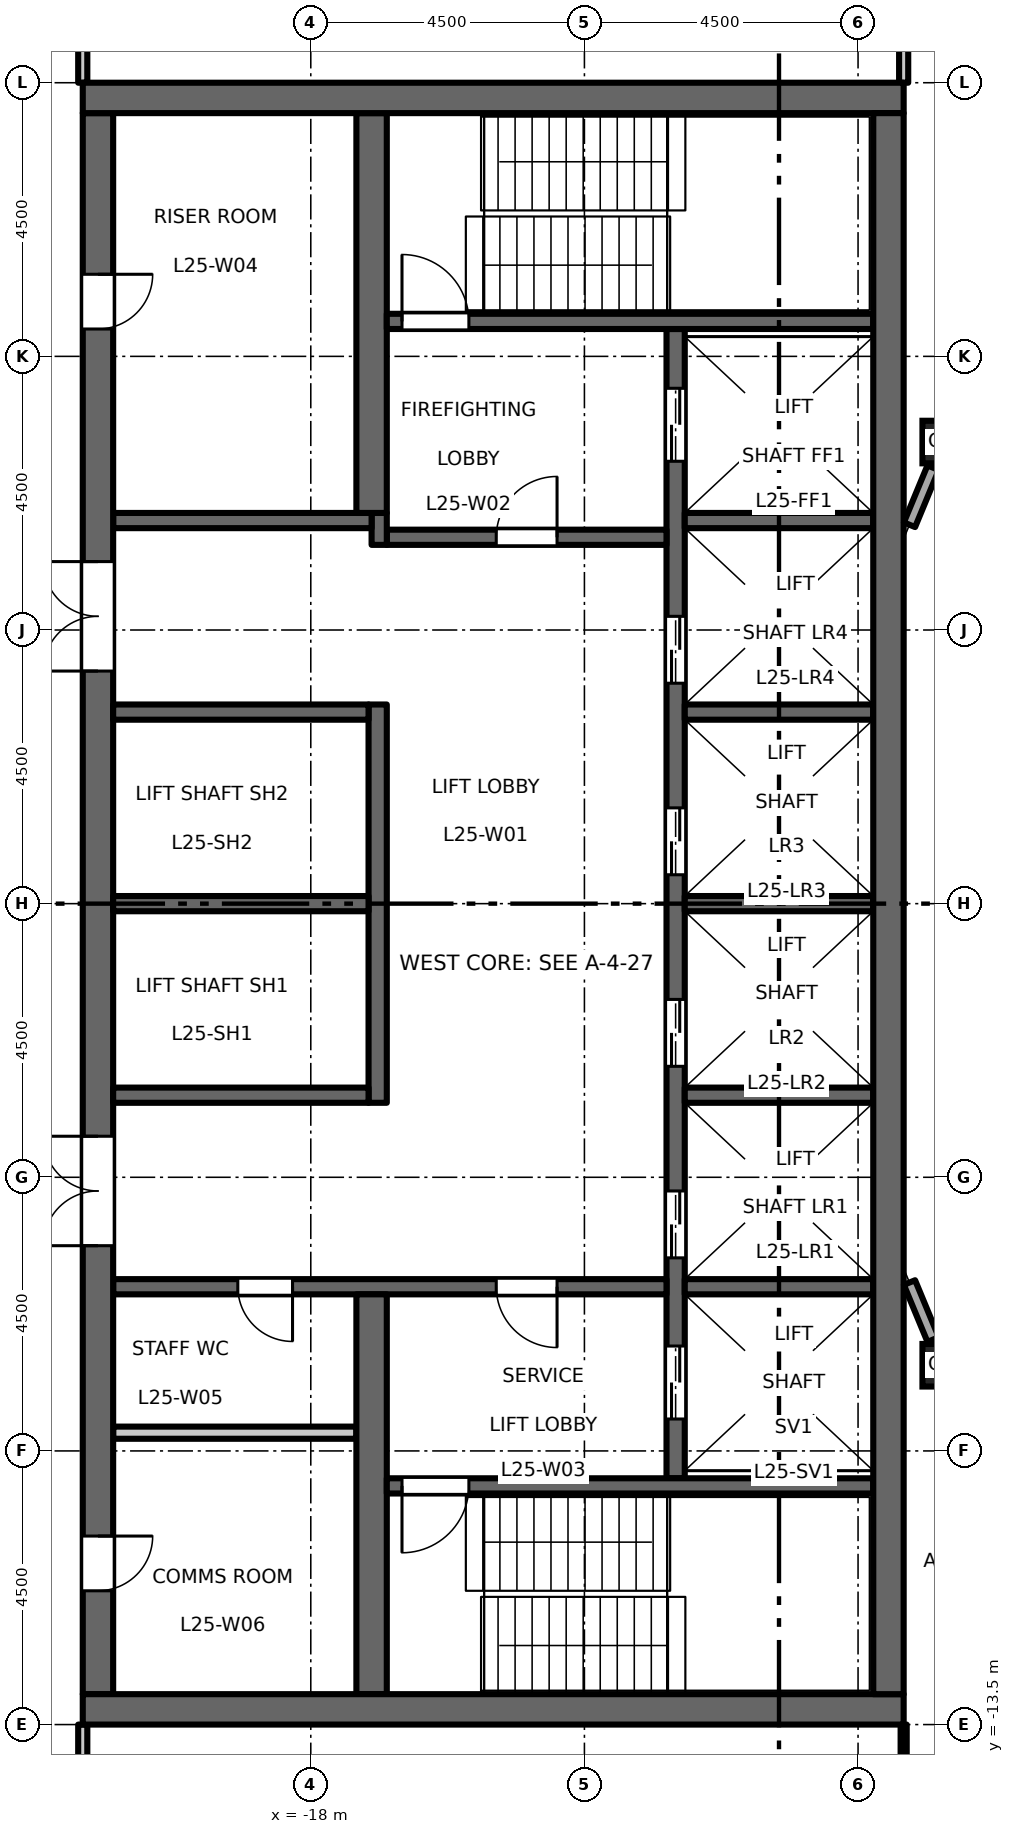
"""IFC4 building model, lengths in metres.
Left out: names, types, materials, properties, quantities, classifications, styles, units other than length and angle.
Written with IfcOpenShell. Run it as: python <this file> out.ifc"""

import sys

from ifc_helpers import new_model, si_unit, direction, frame, frame_2d, origin, origin_2d, place, context, subcontext, project, spatial, rectangle, hollow_rectangle, extrude, element, fill, save


model = new_model("IFC4")
c1 = context("Model", 3, precision=1e-05, world=origin(), true_north=direction((0.0, 1.0)))
c2 = subcontext(c1, "Body", "Model", "MODEL_VIEW")
j1 = project(units=[si_unit("LENGTHUNIT", "METRE"), si_unit("PLANEANGLEUNIT", "RADIAN")], contexts=[c1])
p1 = place(None, origin())
s1 = spatial("IfcSite", under=j1, at=p1, CompositionType="ELEMENT")
p2 = place(p1, origin())
s2 = spatial("IfcBuilding", under=s1, at=p2, CompositionType="ELEMENT")
p3 = place(p2, frame((0.0, 0.0, 118.2)))
s3 = spatial("IfcBuildingStorey", under=s2, at=p3, CompositionType="ELEMENT", Elevation=118.2)
for number, where, z_axis, x_axis in (
    (1, (-7.591, -7.591, 0.0), (0.0, 0.0, 1.0), (1.0, 0.0, 0.0)),
    (2, (-7.591, 7.591, 0.0), (0.0, 0.0, 1.0), (1.0, 0.0, 0.0)),
):
    element("IfcColumn", number, at=place(p3, frame(where, z_axis=z_axis, x_axis=x_axis)), inside=s3, PredefinedType="COLUMN", context=c2, shape_type="SweptSolid", body=[
        extrude(hollow_rectangle(XDim=0.7, YDim=0.7, WallThickness=0.04, at=origin_2d()), origin(), (0.0, 0.0, 1.0), 4.5),
    ])
p4 = place(p3, frame((-12.0, -9.45, 0.0), z_axis=(0.0, 0.0, 1.0), x_axis=(0.0, 1.0, 0.0)))
e3 = element("IfcWall", 3, at=p4, inside=s3, PredefinedType="SHEAR", context=c2, shape_type="SweptSolid", body=[
    extrude(rectangle(XDim=18.9, YDim=0.3, at=frame_2d((9.45, 0.0))), origin(), (0.0, 0.0, 1.0), 4.35),
])
p5 = place(p4, frame((3.625, 0.0, 0.0)))
e4 = element("IfcOpeningElement", 4, at=p5, cuts=e3, PredefinedType="OPENING", context=c2, shape_type="SweptSolid", body=[
    extrude(rectangle(XDim=1.1, YDim=2.1, at=frame_2d((0.55, 1.05))), frame((0.0, 0.16, 0.0), z_axis=(0.0, -1.0, 0.0), x_axis=(1.0, 0.0, 0.0)), (0.0, 0.0, 1.0), 0.32),
])
p6 = place(p4, frame((6.775, 0.0, 0.0)))
e5 = element("IfcOpeningElement", 5, at=p6, cuts=e3, PredefinedType="OPENING", context=c2, shape_type="SweptSolid", body=[
    extrude(rectangle(XDim=1.1, YDim=2.1, at=frame_2d((0.55, 1.05))), frame((0.0, 0.16, 0.0), z_axis=(0.0, -1.0, 0.0), x_axis=(1.0, 0.0, 0.0)), (0.0, 0.0, 1.0), 0.32),
])
p7 = place(p4, frame((9.925, 0.0, 0.0)))
e6 = element("IfcOpeningElement", 6, at=p7, cuts=e3, PredefinedType="OPENING", context=c2, shape_type="SweptSolid", body=[
    extrude(rectangle(XDim=1.1, YDim=2.1, at=frame_2d((0.55, 1.05))), frame((0.0, 0.16, 0.0), z_axis=(0.0, -1.0, 0.0), x_axis=(1.0, 0.0, 0.0)), (0.0, 0.0, 1.0), 0.32),
])
p8 = place(p4, frame((13.075, 0.0, 0.0)))
e7 = element("IfcOpeningElement", 7, at=p8, cuts=e3, PredefinedType="OPENING", context=c2, shape_type="SweptSolid", body=[
    extrude(rectangle(XDim=1.1, YDim=2.1, at=frame_2d((0.55, 1.05))), frame((0.0, 0.16, 0.0), z_axis=(0.0, -1.0, 0.0), x_axis=(1.0, 0.0, 0.0)), (0.0, 0.0, 1.0), 0.32),
])
p9 = place(p4, frame((16.725, 0.0, 0.0)))
e8 = element("IfcOpeningElement", 8, at=p9, cuts=e3, PredefinedType="OPENING", context=c2, shape_type="SweptSolid", body=[
    extrude(rectangle(XDim=1.2, YDim=2.1, at=frame_2d((0.6, 1.05))), frame((0.0, 0.16, 0.0), z_axis=(0.0, -1.0, 0.0), x_axis=(1.0, 0.0, 0.0)), (0.0, 0.0, 1.0), 0.32),
])
p10 = place(p4, frame((0.975, 0.0, 0.0)))
e9 = element("IfcOpeningElement", 9, at=p10, cuts=e3, PredefinedType="OPENING", context=c2, shape_type="SweptSolid", body=[
    extrude(rectangle(XDim=1.2, YDim=2.1, at=frame_2d((0.6, 1.05))), frame((0.0, 0.16, 0.0), z_axis=(0.0, -1.0, 0.0), x_axis=(1.0, 0.0, 0.0)), (0.0, 0.0, 1.0), 0.32),
])
p11 = place(p3, frame((-12.15, 6.025, 0.0), z_axis=(0.0, 0.0, 1.0), x_axis=(-1.0, 0.0, 0.0)))
e10 = element("IfcWall", 10, at=p11, inside=s3, PredefinedType="SHEAR", context=c2, shape_type="SweptSolid", body=[
    extrude(rectangle(XDim=4.6, YDim=0.25, at=frame_2d((2.3, 0.0))), origin(), (0.0, 0.0, 1.0), 4.35),
])
p12 = place(p11, frame((1.8, 0.0, 0.0)))
e11 = element("IfcOpeningElement", 11, at=p12, cuts=e10, PredefinedType="OPENING", context=c2, shape_type="SweptSolid", body=[
    extrude(rectangle(XDim=1.0, YDim=2.1, at=frame_2d((0.5, 1.05))), frame((0.0, 0.135, 0.0), z_axis=(0.0, -1.0, 0.0), x_axis=(1.0, 0.0, 0.0)), (0.0, 0.0, 1.0), 0.27),
])
p13 = place(p3, frame((-16.875, 5.9, 0.0), z_axis=(0.0, 0.0, 1.0), x_axis=(0.0, 1.0, 0.0)))
e12 = element("IfcWall", 12, at=p13, inside=s3, PredefinedType="SHEAR", context=c2, shape_type="SweptSolid", body=[
    extrude(rectangle(XDim=0.525, YDim=0.25, at=frame_2d((0.263, 0.0))), origin(), (0.0, 0.0, 1.0), 4.35),
])
p14 = place(p3, frame((-17.0, 6.3, 0.0), z_axis=(0.0, 0.0, 1.0), x_axis=(-1.0, 0.0, 0.0)))
e13 = element("IfcWall", 13, at=p14, inside=s3, PredefinedType="SHEAR", context=c2, shape_type="SweptSolid", body=[
    extrude(rectangle(XDim=4.25, YDim=0.25, at=frame_2d((2.125, 0.0))), origin(), (0.0, 0.0, 1.0), 4.35),
])
p15 = place(p3, frame((-12.15, -6.3, 0.0), z_axis=(0.0, 0.0, 1.0), x_axis=(-1.0, 0.0, 0.0)))
e14 = element("IfcWall", 14, at=p15, inside=s3, PredefinedType="SHEAR", context=c2, shape_type="SweptSolid", body=[
    extrude(rectangle(XDim=9.1, YDim=0.25, at=frame_2d((4.55, 0.0))), origin(), (0.0, 0.0, 1.0), 4.35),
])
p16 = place(p15, frame((1.8, 0.0, 0.0)))
e15 = element("IfcOpeningElement", 15, at=p16, cuts=e14, PredefinedType="OPENING", context=c2, shape_type="SweptSolid", body=[
    extrude(rectangle(XDim=1.0, YDim=2.1, at=frame_2d((0.5, 1.05))), frame((0.0, 0.135, 0.0), z_axis=(0.0, -1.0, 0.0), x_axis=(1.0, 0.0, 0.0)), (0.0, 0.0, 1.0), 0.27),
])
p17 = place(p15, frame((6.15, 0.0, 0.0)))
e16 = element("IfcOpeningElement", 16, at=p17, cuts=e14, PredefinedType="OPENING", context=c2, shape_type="SweptSolid", body=[
    extrude(rectangle(XDim=0.9, YDim=2.1, at=frame_2d((0.45, 1.05))), frame((0.0, 0.135, 0.0), z_axis=(0.0, -1.0, 0.0), x_axis=(1.0, 0.0, 0.0)), (0.0, 0.0, 1.0), 0.27),
])
p18 = place(p3, frame((-21.5, -13.0, 0.0), z_axis=(0.0, 0.0, 1.0), x_axis=(0.0, 1.0, 0.0)))
e17 = element("IfcWall", 17, at=p18, inside=s3, PredefinedType="SHEAR", context=c2, shape_type="SweptSolid", body=[
    extrude(rectangle(XDim=26.0, YDim=0.5, at=frame_2d((13.0, 0.0))), origin(), (0.0, 0.0, 1.0), 4.35),
])
p19 = place(p18, frame((16.825, 0.0, 0.0)))
e18 = element("IfcOpeningElement", 18, at=p19, cuts=e17, PredefinedType="OPENING", context=c2, shape_type="SweptSolid", body=[
    extrude(rectangle(XDim=1.8, YDim=2.1, at=frame_2d((0.9, 1.05))), frame((0.0, 0.26, 0.0), z_axis=(0.0, -1.0, 0.0), x_axis=(1.0, 0.0, 0.0)), (0.0, 0.0, 1.0), 0.52),
])
p20 = place(p18, frame((7.375, 0.0, 0.0)))
e19 = element("IfcOpeningElement", 19, at=p20, cuts=e17, PredefinedType="OPENING", context=c2, shape_type="SweptSolid", body=[
    extrude(rectangle(XDim=1.8, YDim=2.1, at=frame_2d((0.9, 1.05))), frame((0.0, 0.26, 0.0), z_axis=(0.0, -1.0, 0.0), x_axis=(1.0, 0.0, 0.0)), (0.0, 0.0, 1.0), 0.52),
])
p21 = place(p18, frame((22.45, 0.0, 0.0)))
e20 = element("IfcOpeningElement", 20, at=p21, cuts=e17, PredefinedType="OPENING", context=c2, shape_type="SweptSolid", body=[
    extrude(rectangle(XDim=0.9, YDim=2.1, at=frame_2d((0.45, 1.05))), frame((0.0, 0.26, 0.0), z_axis=(0.0, -1.0, 0.0), x_axis=(1.0, 0.0, 0.0)), (0.0, 0.0, 1.0), 0.52),
])
p22 = place(p18, frame((1.7, 0.0, 0.0)))
e21 = element("IfcOpeningElement", 21, at=p22, cuts=e17, PredefinedType="OPENING", context=c2, shape_type="SweptSolid", body=[
    extrude(rectangle(XDim=0.9, YDim=2.1, at=frame_2d((0.45, 1.05))), frame((0.0, 0.26, 0.0), z_axis=(0.0, -1.0, 0.0), x_axis=(1.0, 0.0, 0.0)), (0.0, 0.0, 1.0), 0.52),
])
p23 = place(p3, frame((-17.25, -8.7, 0.0), z_axis=(0.0, 0.0, 1.0), x_axis=(-1.0, 0.0, 0.0)))
e22 = element("IfcWall", 22, at=p23, inside=s3, PredefinedType="PARTITIONING", context=c2, shape_type="SweptSolid", body=[
    extrude(rectangle(XDim=4.0, YDim=0.2, at=frame_2d((2.0, 0.0))), origin(), (0.0, 0.0, 1.0), 4.35),
])
p24 = place(p3, frame((-16.9, -3.275, 0.0), z_axis=(0.0, 0.0, 1.0), x_axis=(0.0, 1.0, 0.0)))
e23 = element("IfcWall", 23, at=p24, inside=s3, PredefinedType="SHEAR", context=c2, shape_type="SweptSolid", body=[
    extrude(rectangle(XDim=6.55, YDim=0.3, at=frame_2d((3.275, 0.0))), origin(), (0.0, 0.0, 1.0), 4.35),
])
for number, where, z_axis, x_axis in (
    (24, (-17.05, 0.0, 0.0), (0.0, 0.0, 1.0), (-1.0, 0.0, 0.0)),
    (25, (-17.05, 3.15, 0.0), (0.0, 0.0, 1.0), (-1.0, 0.0, 0.0)),
    (26, (-17.05, -3.15, 0.0), (0.0, 0.0, 1.0), (-1.0, 0.0, 0.0)),
):
    element("IfcWall", number, at=place(p3, frame(where, z_axis=z_axis, x_axis=x_axis)), inside=s3, PredefinedType="SHEAR", context=c2, shape_type="SweptSolid", body=[
        extrude(rectangle(XDim=4.2, YDim=0.25, at=frame_2d((2.1, 0.0))), origin(), (0.0, 0.0, 1.0), 4.35),
    ])
for number, where, z_axis, x_axis in (
    (27, (-17.0, 6.425, 0.0), (0.0, 0.0, 1.0), (0.0, 1.0, 0.0)),
    (28, (-17.0, -13.0, 0.0), (0.0, 0.0, 1.0), (0.0, 1.0, 0.0)),
):
    element("IfcWall", number, at=place(p3, frame(where, z_axis=z_axis, x_axis=x_axis)), inside=s3, PredefinedType="SHEAR", context=c2, shape_type="SweptSolid", body=[
        extrude(rectangle(XDim=6.575, YDim=0.5, at=frame_2d((3.288, 0.0))), origin(), (0.0, 0.0, 1.0), 4.35),
    ])
for number, where, z_axis, x_axis in (
    (29, (-8.75, 0.0, 0.0), (0.0, 0.0, 1.0), (-1.0, 0.0, 0.0)),
    (30, (-8.75, 3.15, 0.0), (0.0, 0.0, 1.0), (-1.0, 0.0, 0.0)),
    (31, (-8.75, 6.3, 0.0), (0.0, 0.0, 1.0), (-1.0, 0.0, 0.0)),
    (32, (-8.75, -3.15, 0.0), (0.0, 0.0, 1.0), (-1.0, 0.0, 0.0)),
    (33, (-8.75, -6.3, 0.0), (0.0, 0.0, 1.0), (-1.0, 0.0, 0.0)),
):
    element("IfcWall", number, at=place(p3, frame(where, z_axis=z_axis, x_axis=x_axis)), inside=s3, PredefinedType="SHEAR", context=c2, shape_type="SweptSolid", body=[
        extrude(rectangle(XDim=3.1, YDim=0.25, at=frame_2d((1.55, 0.0))), origin(), (0.0, 0.0, 1.0), 4.35),
    ])
p25 = place(p3, frame((-8.75, 9.575, 0.0), z_axis=(0.0, 0.0, 1.0), x_axis=(-1.0, 0.0, 0.0)))
e34 = element("IfcWall", 34, at=p25, inside=s3, PredefinedType="SHEAR", context=c2, shape_type="SweptSolid", body=[
    extrude(rectangle(XDim=8.0, YDim=0.25, at=frame_2d((4.0, 0.0))), origin(), (0.0, 0.0, 1.0), 4.35),
])
p26 = place(p25, frame((6.65, 0.0, 0.0)))
e35 = element("IfcOpeningElement", 35, at=p26, cuts=e34, PredefinedType="OPENING", context=c2, shape_type="SweptSolid", body=[
    extrude(rectangle(XDim=1.1, YDim=2.1, at=frame_2d((0.55, 1.05))), frame((0.0, 0.135, 0.0), z_axis=(0.0, -1.0, 0.0), x_axis=(1.0, 0.0, 0.0)), (0.0, 0.0, 1.0), 0.27),
])
p27 = place(p3, frame((-8.75, -9.575, 0.0), z_axis=(0.0, 0.0, 1.0), x_axis=(-1.0, 0.0, 0.0)))
e36 = element("IfcWall", 36, at=p27, inside=s3, PredefinedType="SHEAR", context=c2, shape_type="SweptSolid", body=[
    extrude(rectangle(XDim=8.0, YDim=0.25, at=frame_2d((4.0, 0.0))), origin(), (0.0, 0.0, 1.0), 4.35),
])
p28 = place(p27, frame((6.65, 0.0, 0.0)))
e37 = element("IfcOpeningElement", 37, at=p28, cuts=e36, PredefinedType="OPENING", context=c2, shape_type="SweptSolid", body=[
    extrude(rectangle(XDim=1.1, YDim=2.1, at=frame_2d((0.55, 1.05))), frame((0.0, 0.135, 0.0), z_axis=(0.0, -1.0, 0.0), x_axis=(1.0, 0.0, 0.0)), (0.0, 0.0, 1.0), 0.27),
])
for number, where, z_axis, x_axis in (
    (38, (-8.25, 13.25, 0.0), (0.0, 0.0, 1.0), (-1.0, 0.0, 0.0)),
    (39, (-8.25, -13.25, 0.0), (0.0, 0.0, 1.0), (-1.0, 0.0, 0.0)),
):
    element("IfcWall", number, at=place(p3, frame(where, z_axis=z_axis, x_axis=x_axis)), inside=s3, PredefinedType="SHEAR", context=c2, shape_type="SweptSolid", body=[
        extrude(rectangle(XDim=13.5, YDim=0.5, at=frame_2d((6.75, 0.0))), origin(), (0.0, 0.0, 1.0), 4.35),
    ])
p29 = place(p3, frame((-8.5, -13.0, 0.0), z_axis=(0.0, 0.0, 1.0), x_axis=(0.0, 1.0, 0.0)))
e40 = element("IfcWall", 40, at=p29, inside=s3, PredefinedType="SHEAR", context=c2, shape_type="SweptSolid", body=[
    extrude(rectangle(XDim=26.0, YDim=0.5, at=frame_2d((13.0, 0.0))), origin(), (0.0, 0.0, 1.0), 4.35),
])
for number, where, z_axis, x_axis in (
    (41, (-7.766, 7.168, 0.0), (0.0, 0.0, 1.0), (-0.383, -0.924, 0.0)),
    (42, (-8.154, -6.231, 0.0), (0.0, 0.0, 1.0), (0.383, -0.924, 0.0)),
):
    element("IfcWall", number, at=place(p3, frame(where, z_axis=z_axis, x_axis=x_axis)), inside=s3, PredefinedType="STANDARD", context=c2, shape_type="SweptSolid", body=[
        extrude(rectangle(XDim=1.015, YDim=0.2, at=frame_2d((0.507, 0.0))), origin(), (0.0, 0.0, 1.0), 3.826),
    ])
for number, where, z_axis, x_axis in (
    (43, (-21.75, -17.925, 0.0), (0.0, 0.0, 1.0), (0.0, 1.0, 0.0)),
    (44, (-21.75, 13.5, 0.0), (0.0, 0.0, 1.0), (0.0, 1.0, 0.0)),
):
    element("IfcWall", number, at=place(p3, frame(where, z_axis=z_axis, x_axis=x_axis)), inside=s3, PredefinedType="PARTITIONING", context=c2, shape_type="SweptSolid", body=[
        extrude(rectangle(XDim=4.425, YDim=0.15, at=frame_2d((2.212, 0.0))), origin(), (0.0, 0.0, 1.0), 4.35),
    ])
p30 = place(p3, frame((-8.25, -17.925, 0.0), z_axis=(0.0, 0.0, 1.0), x_axis=(0.0, 1.0, 0.0)))
e45 = element("IfcWall", 45, at=p30, inside=s3, PredefinedType="PARTITIONING", context=c2, shape_type="SweptSolid", body=[
    extrude(rectangle(XDim=4.425, YDim=0.1, at=frame_2d((2.212, 0.0))), origin(), (0.0, 0.0, 1.0), 4.35),
])
p31 = place(p3, frame((-8.25, 13.5, 0.0), z_axis=(0.0, 0.0, 1.0), x_axis=(0.0, 1.0, 0.0)))
e46 = element("IfcWall", 46, at=p31, inside=s3, PredefinedType="PARTITIONING", context=c2, shape_type="SweptSolid", body=[
    extrude(rectangle(XDim=4.425, YDim=0.15, at=frame_2d((2.212, 0.0))), origin(), (0.0, 0.0, 1.0), 4.35),
])
p32 = place(p12, origin())
e47 = element("IfcDoor", 47, at=p32, inside=s3, OperationType="SINGLE_SWING_LEFT", PredefinedType="DOOR", context=c2, shape_type="SweptSolid", body=[
    extrude(rectangle(XDim=1.0, YDim=2.1, at=frame_2d((0.5, 1.05))), frame((0.0, 0.025, 0.0), z_axis=(0.0, -1.0, 0.0), x_axis=(1.0, 0.0, 0.0)), (0.0, 0.0, 1.0), 0.05),
])
fill(e11, e47)
p33 = place(p16, origin())
e48 = element("IfcDoor", 48, at=p33, inside=s3, OperationType="SINGLE_SWING_RIGHT", PredefinedType="DOOR", context=c2, shape_type="SweptSolid", body=[
    extrude(rectangle(XDim=1.0, YDim=2.1, at=frame_2d((0.5, 1.05))), frame((0.0, 0.025, 0.0), z_axis=(0.0, -1.0, 0.0), x_axis=(1.0, 0.0, 0.0)), (0.0, 0.0, 1.0), 0.05),
])
fill(e15, e48)
p34 = place(p26, origin())
e49 = element("IfcDoor", 49, at=p34, inside=s3, OperationType="SINGLE_SWING_RIGHT", PredefinedType="DOOR", context=c2, shape_type="SweptSolid", body=[
    extrude(rectangle(XDim=1.1, YDim=2.1, at=frame_2d((0.55, 1.05))), frame((0.0, 0.025, 0.0), z_axis=(0.0, -1.0, 0.0), x_axis=(1.0, 0.0, 0.0)), (0.0, 0.0, 1.0), 0.05),
])
fill(e35, e49)
p35 = place(p28, origin())
e50 = element("IfcDoor", 50, at=p35, inside=s3, OperationType="SINGLE_SWING_LEFT", PredefinedType="DOOR", context=c2, shape_type="SweptSolid", body=[
    extrude(rectangle(XDim=1.1, YDim=2.1, at=frame_2d((0.55, 1.05))), frame((0.0, 0.025, 0.0), z_axis=(0.0, -1.0, 0.0), x_axis=(1.0, 0.0, 0.0)), (0.0, 0.0, 1.0), 0.05),
])
fill(e37, e50)
p36 = place(p19, origin())
e51 = element("IfcDoor", 51, at=p36, inside=s3, OperationType="DOUBLE_DOOR_DOUBLE_SWING", PredefinedType="DOOR", context=c2, shape_type="SweptSolid", body=[
    extrude(rectangle(XDim=1.8, YDim=2.1, at=frame_2d((0.9, 1.05))), frame((0.0, 0.025, 0.0), z_axis=(0.0, -1.0, 0.0), x_axis=(1.0, 0.0, 0.0)), (0.0, 0.0, 1.0), 0.05),
])
fill(e18, e51)
p37 = place(p20, origin())
e52 = element("IfcDoor", 52, at=p37, inside=s3, OperationType="DOUBLE_DOOR_DOUBLE_SWING", PredefinedType="DOOR", context=c2, shape_type="SweptSolid", body=[
    extrude(rectangle(XDim=1.8, YDim=2.1, at=frame_2d((0.9, 1.05))), frame((0.0, 0.025, 0.0), z_axis=(0.0, -1.0, 0.0), x_axis=(1.0, 0.0, 0.0)), (0.0, 0.0, 1.0), 0.05),
])
fill(e19, e52)
p38 = place(p5, origin())
e53 = element("IfcDoor", 53, at=p38, inside=s3, OperationType="DOUBLE_DOOR_SLIDING", PredefinedType="DOOR", context=c2, shape_type="SweptSolid", body=[
    extrude(rectangle(XDim=1.1, YDim=2.1, at=frame_2d((0.55, 1.05))), frame((0.0, 0.025, 0.0), z_axis=(0.0, -1.0, 0.0), x_axis=(1.0, 0.0, 0.0)), (0.0, 0.0, 1.0), 0.05),
])
fill(e4, e53)
p39 = place(p6, origin())
e54 = element("IfcDoor", 54, at=p39, inside=s3, OperationType="DOUBLE_DOOR_SLIDING", PredefinedType="DOOR", context=c2, shape_type="SweptSolid", body=[
    extrude(rectangle(XDim=1.1, YDim=2.1, at=frame_2d((0.55, 1.05))), frame((0.0, 0.025, 0.0), z_axis=(0.0, -1.0, 0.0), x_axis=(1.0, 0.0, 0.0)), (0.0, 0.0, 1.0), 0.05),
])
fill(e5, e54)
p40 = place(p7, origin())
e55 = element("IfcDoor", 55, at=p40, inside=s3, OperationType="DOUBLE_DOOR_SLIDING", PredefinedType="DOOR", context=c2, shape_type="SweptSolid", body=[
    extrude(rectangle(XDim=1.1, YDim=2.1, at=frame_2d((0.55, 1.05))), frame((0.0, 0.025, 0.0), z_axis=(0.0, -1.0, 0.0), x_axis=(1.0, 0.0, 0.0)), (0.0, 0.0, 1.0), 0.05),
])
fill(e6, e55)
p41 = place(p8, origin())
e56 = element("IfcDoor", 56, at=p41, inside=s3, OperationType="DOUBLE_DOOR_SLIDING", PredefinedType="DOOR", context=c2, shape_type="SweptSolid", body=[
    extrude(rectangle(XDim=1.1, YDim=2.1, at=frame_2d((0.55, 1.05))), frame((0.0, 0.025, 0.0), z_axis=(0.0, -1.0, 0.0), x_axis=(1.0, 0.0, 0.0)), (0.0, 0.0, 1.0), 0.05),
])
fill(e7, e56)
p42 = place(p9, origin())
e57 = element("IfcDoor", 57, at=p42, inside=s3, OperationType="DOUBLE_DOOR_SLIDING", PredefinedType="DOOR", context=c2, shape_type="SweptSolid", body=[
    extrude(rectangle(XDim=1.2, YDim=2.1, at=frame_2d((0.6, 1.05))), frame((0.0, 0.025, 0.0), z_axis=(0.0, -1.0, 0.0), x_axis=(1.0, 0.0, 0.0)), (0.0, 0.0, 1.0), 0.05),
])
fill(e8, e57)
p43 = place(p10, origin())
e58 = element("IfcDoor", 58, at=p43, inside=s3, OperationType="DOUBLE_DOOR_SLIDING", PredefinedType="DOOR", context=c2, shape_type="SweptSolid", body=[
    extrude(rectangle(XDim=1.2, YDim=2.1, at=frame_2d((0.6, 1.05))), frame((0.0, 0.025, 0.0), z_axis=(0.0, -1.0, 0.0), x_axis=(1.0, 0.0, 0.0)), (0.0, 0.0, 1.0), 0.05),
])
fill(e9, e58)
p44 = place(p21, origin())
e59 = element("IfcDoor", 59, at=p44, inside=s3, OperationType="SINGLE_SWING_RIGHT", PredefinedType="DOOR", context=c2, shape_type="SweptSolid", body=[
    extrude(rectangle(XDim=0.9, YDim=2.1, at=frame_2d((0.45, 1.05))), frame((0.0, 0.025, 0.0), z_axis=(0.0, -1.0, 0.0), x_axis=(1.0, 0.0, 0.0)), (0.0, 0.0, 1.0), 0.05),
])
fill(e20, e59)
p45 = place(p17, origin())
e60 = element("IfcDoor", 60, at=p45, inside=s3, OperationType="SINGLE_SWING_RIGHT", PredefinedType="DOOR", context=c2, shape_type="SweptSolid", body=[
    extrude(rectangle(XDim=0.9, YDim=2.1, at=frame_2d((0.45, 1.05))), frame((0.0, 0.025, 0.0), z_axis=(0.0, -1.0, 0.0), x_axis=(1.0, 0.0, 0.0)), (0.0, 0.0, 1.0), 0.05),
])
fill(e16, e60)
p46 = place(p22, origin())
e61 = element("IfcDoor", 61, at=p46, inside=s3, OperationType="SINGLE_SWING_RIGHT", PredefinedType="DOOR", context=c2, shape_type="SweptSolid", body=[
    extrude(rectangle(XDim=0.9, YDim=2.1, at=frame_2d((0.45, 1.05))), frame((0.0, 0.025, 0.0), z_axis=(0.0, -1.0, 0.0), x_axis=(1.0, 0.0, 0.0)), (0.0, 0.0, 1.0), 0.05),
])
fill(e21, e61)
save(model, sys.argv[1])
